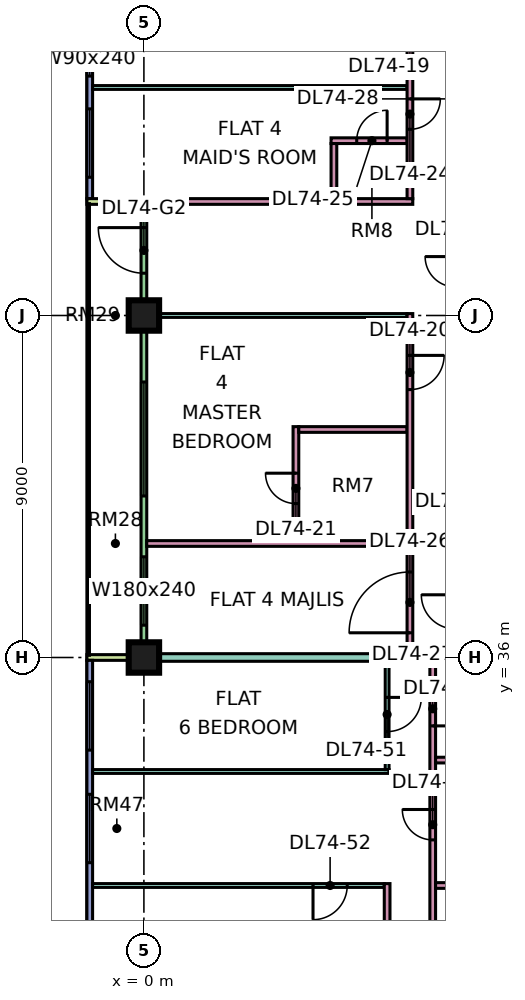
"""IFC4 building model, lengths in metres.
Left out: names, types, materials, properties, quantities, classifications, styles, units other than length and angle.
Written with IfcOpenShell. Run it as: python <this file> out.ifc"""

import sys

from ifc_helpers import new_model, si_unit, direction, frame, frame_2d, origin, origin_2d, place, context, subcontext, project, spatial, rectangle, extrude, element, fill, save


model = new_model("IFC4")
c1 = context("Model", 3, precision=1e-05, world=origin(), true_north=direction((0.0, 1.0)))
c2 = subcontext(c1, "Body", "Model", "MODEL_VIEW")
j1 = project(units=[si_unit("LENGTHUNIT", "METRE"), si_unit("PLANEANGLEUNIT", "RADIAN")], contexts=[c1])
p1 = place(None, origin())
s1 = spatial("IfcSite", under=j1, at=p1, CompositionType="ELEMENT")
p2 = place(p1, origin())
s2 = spatial("IfcBuilding", under=s1, at=p2, CompositionType="ELEMENT")
p3 = place(p2, frame((0.0, 0.0, 314.65)))
s3 = spatial("IfcBuildingStorey", under=s2, at=p3, CompositionType="ELEMENT", Elevation=314.65)
p4 = place(p3, frame((0.0, 36.0, 0.0), z_axis=(0.0, 0.0, 1.0), x_axis=(1.0, 0.0, 0.0)))
e1 = element("IfcColumn", 1, at=p4, inside=s3, PredefinedType="COLUMN", context=c2, shape_type="SweptSolid", body=[
    extrude(rectangle(XDim=0.8, YDim=0.8, at=origin_2d()), origin(), (0.0, 0.0, 1.0), 3.75),
])
p5 = place(p3, frame((0.0, 45.0, 0.0), z_axis=(0.0, 0.0, 1.0), x_axis=(1.0, 0.0, 0.0)))
e2 = element("IfcColumn", 2, at=p5, inside=s3, PredefinedType="COLUMN", context=c2, shape_type="SweptSolid", body=[
    extrude(rectangle(XDim=0.8, YDim=0.8, at=origin_2d()), origin(), (0.0, 0.0, 1.0), 3.75),
])
p6 = place(p3, frame((-1.425, 52.5, 0.0), z_axis=(0.0, 0.0, 1.0), x_axis=(0.0, -1.0, 0.0)))
e3 = element("IfcWall", 3, at=p6, inside=s3, PredefinedType="SOLIDWALL", context=c2, shape_type="SweptSolid", body=[
    extrude(rectangle(XDim=4.425, YDim=0.15, at=frame_2d((2.212, 0.0))), origin(), (0.0, 0.0, 1.0), 3.35),
])
p7 = place(p6, frame((0.3, 0.0, 0.45)))
e4 = element("IfcOpeningElement", 4, at=p7, cuts=e3, PredefinedType="OPENING", context=c2, shape_type="SweptSolid", body=[
    extrude(rectangle(XDim=0.9, YDim=2.4, at=frame_2d((0.45, 1.2))), frame((0.0, 0.085, 0.0), z_axis=(0.0, -1.0, 0.0), x_axis=(1.0, 0.0, 0.0)), (0.0, 0.0, 1.0), 0.17),
])
p8 = place(p6, frame((2.062, 0.0, 0.45)))
e5 = element("IfcOpeningElement", 5, at=p8, cuts=e3, PredefinedType="OPENING", context=c2, shape_type="SweptSolid", body=[
    extrude(rectangle(XDim=1.8, YDim=2.4, at=frame_2d((0.9, 1.2))), frame((0.0, 0.085, 0.0), z_axis=(0.0, -1.0, 0.0), x_axis=(1.0, 0.0, 0.0)), (0.0, 0.0, 1.0), 0.17),
])
p9 = place(p3, frame((0.0, 47.925, 0.0), z_axis=(0.0, 0.0, 1.0), x_axis=(0.0, -1.0, 0.0)))
e6 = element("IfcWall", 6, at=p9, inside=s3, PredefinedType="SOLIDWALL", context=c2, shape_type="SweptSolid", body=[
    extrude(rectangle(XDim=11.85, YDim=0.15, at=frame_2d((5.925, 0.0))), origin(), (0.0, 0.0, 1.0), 3.35),
])
p10 = place(p9, frame((0.613, 0.0, 0.0)))
e7 = element("IfcOpeningElement", 7, at=p10, cuts=e6, PredefinedType="OPENING", context=c2, shape_type="SweptSolid", body=[
    extrude(rectangle(XDim=1.2, YDim=2.4, at=frame_2d((0.6, 1.2))), frame((0.0, 0.085, 0.0), z_axis=(0.0, -1.0, 0.0), x_axis=(1.0, 0.0, 0.0)), (0.0, 0.0, 1.0), 0.17),
])
p11 = place(p9, frame((4.675, 0.0, 0.45)))
e8 = element("IfcOpeningElement", 8, at=p11, cuts=e6, PredefinedType="OPENING", context=c2, shape_type="SweptSolid", body=[
    extrude(rectangle(XDim=3.0, YDim=2.4, at=frame_2d((1.5, 1.2))), frame((0.0, 0.085, 0.0), z_axis=(0.0, -1.0, 0.0), x_axis=(1.0, 0.0, 0.0)), (0.0, 0.0, 1.0), 0.17),
])
p12 = place(p9, frame((9.275, 0.0, 0.45)))
e9 = element("IfcOpeningElement", 9, at=p12, cuts=e6, PredefinedType="OPENING", context=c2, shape_type="SweptSolid", body=[
    extrude(rectangle(XDim=1.8, YDim=2.4, at=frame_2d((0.9, 1.2))), frame((0.0, 0.085, 0.0), z_axis=(0.0, -1.0, 0.0), x_axis=(1.0, 0.0, 0.0)), (0.0, 0.0, 1.0), 0.17),
])
for number, where, z_axis, x_axis in (
    (10, (-1.5, 48.0, 0.0), (0.0, 0.0, 1.0), (1.0, 0.0, 0.0)),
    (11, (-1.5, 36.0, 0.0), (0.0, 0.0, 1.0), (1.0, 0.0, 0.0)),
):
    element("IfcWall", number, at=place(p3, frame(where, z_axis=z_axis, x_axis=x_axis)), inside=s3, PredefinedType="SOLIDWALL", context=c2, shape_type="SweptSolid", body=[
        extrude(rectangle(XDim=1.5, YDim=0.15, at=frame_2d((0.75, 0.0))), origin(), (0.0, 0.0, 1.0), 3.35),
    ])
p13 = place(p3, frame((-1.425, 35.925, 0.0), z_axis=(0.0, 0.0, 1.0), x_axis=(0.0, -1.0, 0.0)))
e12 = element("IfcWall", 12, at=p13, inside=s3, PredefinedType="SOLIDWALL", context=c2, shape_type="SweptSolid", body=[
    extrude(rectangle(XDim=11.85, YDim=0.15, at=frame_2d((5.925, 0.0))), origin(), (0.0, 0.0, 1.0), 3.35),
])
p14 = place(p13, frame((0.562, 0.0, 0.45)))
e13 = element("IfcOpeningElement", 13, at=p14, cuts=e12, PredefinedType="OPENING", context=c2, shape_type="SweptSolid", body=[
    extrude(rectangle(XDim=1.8, YDim=2.4, at=frame_2d((0.9, 1.2))), frame((0.0, 0.085, 0.0), z_axis=(0.0, -1.0, 0.0), x_axis=(1.0, 0.0, 0.0)), (0.0, 0.0, 1.0), 0.17),
])
p15 = place(p13, frame((3.525, 0.0, 0.45)))
e14 = element("IfcOpeningElement", 14, at=p15, cuts=e12, PredefinedType="OPENING", context=c2, shape_type="SweptSolid", body=[
    extrude(rectangle(XDim=1.8, YDim=2.4, at=frame_2d((0.9, 1.2))), frame((0.0, 0.085, 0.0), z_axis=(0.0, -1.0, 0.0), x_axis=(1.0, 0.0, 0.0)), (0.0, 0.0, 1.0), 0.17),
])
p16 = place(p13, frame((7.387, 0.0, 0.45)))
e15 = element("IfcOpeningElement", 15, at=p16, cuts=e12, PredefinedType="OPENING", context=c2, shape_type="SweptSolid", body=[
    extrude(rectangle(XDim=3.0, YDim=2.4, at=frame_2d((1.5, 1.2))), frame((0.0, 0.085, 0.0), z_axis=(0.0, -1.0, 0.0), x_axis=(1.0, 0.0, 0.0)), (0.0, 0.0, 1.0), 0.17),
])
p17 = place(p3, frame((-1.351, 51.0, 0.0), z_axis=(0.0, 0.0, 1.0), x_axis=(1.0, 0.0, 0.0)))
e16 = element("IfcWall", 16, at=p17, inside=s3, PredefinedType="PARTITIONING", context=c2, shape_type="SweptSolid", body=[
    extrude(rectangle(XDim=8.276, YDim=0.1, at=frame_2d((4.138, 0.0))), origin(), (0.0, 0.0, 1.0), 3.35),
])
p18 = place(p3, frame((-1.35, 30.0, 0.0), z_axis=(0.0, 0.0, 1.0), x_axis=(1.0, 0.0, 0.0)))
e17 = element("IfcWall", 17, at=p18, inside=s3, PredefinedType="PARTITIONING", context=c2, shape_type="SweptSolid", body=[
    extrude(rectangle(XDim=7.675, YDim=0.1, at=frame_2d((3.837, 0.0))), origin(), (0.0, 0.0, 1.0), 3.35),
])
p19 = place(p18, frame((5.8, 0.0, 0.0)))
e18 = element("IfcOpeningElement", 18, at=p19, cuts=e17, PredefinedType="OPENING", context=c2, shape_type="SweptSolid", body=[
    extrude(rectangle(XDim=0.9, YDim=2.1, at=frame_2d((0.45, 1.05))), frame((0.0, 0.06, 0.0), z_axis=(0.0, -1.0, 0.0), x_axis=(1.0, 0.0, 0.0)), (0.0, 0.0, 1.0), 0.12),
])
p20 = place(p3, frame((-1.35, 33.0, 0.0), z_axis=(0.0, 0.0, 1.0), x_axis=(1.0, 0.0, 0.0)))
e19 = element("IfcWall", 19, at=p20, inside=s3, PredefinedType="PARTITIONING", context=c2, shape_type="SweptSolid", body=[
    extrude(rectangle(XDim=7.8, YDim=0.1, at=frame_2d((3.9, 0.0))), origin(), (0.0, 0.0, 1.0), 3.35),
])
e20 = element("IfcWall", 20, at=p4, inside=s3, PredefinedType="PARTITIONING", context=c2, shape_type="SweptSolid", body=[
    extrude(rectangle(XDim=12.3, YDim=0.2, at=frame_2d((6.15, 0.0))), origin(), (0.0, 0.0, 1.0), 3.35),
])
p21 = place(p3, frame((0.0, 48.0, 0.0), z_axis=(0.0, 0.0, 1.0), x_axis=(1.0, 0.0, 0.0)))
e21 = element("IfcWall", 21, at=p21, inside=s3, PredefinedType="PARTITIONING", context=c2, shape_type="SweptSolid", body=[
    extrude(rectangle(XDim=7.075, YDim=0.15, at=frame_2d((3.538, 0.0))), origin(), (0.0, 0.0, 1.0), 3.35),
])
p22 = place(p3, frame((0.074, 39.0, 0.0), z_axis=(0.0, 0.0, 1.0), x_axis=(1.0, 0.0, 0.0)))
e22 = element("IfcWall", 22, at=p22, inside=s3, PredefinedType="PARTITIONING", context=c2, shape_type="SweptSolid", body=[
    extrude(rectangle(XDim=6.851, YDim=0.15, at=frame_2d((3.426, 0.0))), origin(), (0.0, 0.0, 1.0), 3.35),
])
p23 = place(p3, frame((0.074, 45.0, 0.0), z_axis=(0.0, 0.0, 1.0), x_axis=(1.0, 0.0, 0.0)))
e23 = element("IfcWall", 23, at=p23, inside=s3, PredefinedType="PARTITIONING", context=c2, shape_type="SweptSolid", body=[
    extrude(rectangle(XDim=6.851, YDim=0.1, at=frame_2d((3.426, 0.0))), origin(), (0.0, 0.0, 1.0), 3.35),
])
p24 = place(p3, frame((4.0, 39.075, 0.0), z_axis=(0.0, 0.0, 1.0), x_axis=(0.0, 1.0, 0.0)))
e24 = element("IfcWall", 24, at=p24, inside=s3, PredefinedType="PARTITIONING", context=c2, shape_type="SweptSolid", body=[
    extrude(rectangle(XDim=3.0, YDim=0.15, at=frame_2d((1.5, 0.0))), origin(), (0.0, 0.0, 1.0), 3.35),
])
p25 = place(p24, frame((0.975, 0.0, 0.0)))
e25 = element("IfcOpeningElement", 25, at=p25, cuts=e24, PredefinedType="OPENING", context=c2, shape_type="SweptSolid", body=[
    extrude(rectangle(XDim=0.8, YDim=2.1, at=frame_2d((0.4, 1.05))), frame((0.0, 0.085, 0.0), z_axis=(0.0, -1.0, 0.0), x_axis=(1.0, 0.0, 0.0)), (0.0, 0.0, 1.0), 0.17),
])
p26 = place(p3, frame((4.075, 42.0, 0.0), z_axis=(0.0, 0.0, 1.0), x_axis=(1.0, 0.0, 0.0)))
e26 = element("IfcWall", 26, at=p26, inside=s3, PredefinedType="PARTITIONING", context=c2, shape_type="SweptSolid", body=[
    extrude(rectangle(XDim=2.85, YDim=0.15, at=frame_2d((1.425, 0.0))), origin(), (0.0, 0.0, 1.0), 3.35),
])
p27 = place(p3, frame((4.925, 49.6, 0.0), z_axis=(0.0, 0.0, 1.0), x_axis=(1.0, 0.0, 0.0)))
e27 = element("IfcWall", 27, at=p27, inside=s3, PredefinedType="PARTITIONING", context=c2, shape_type="SweptSolid", body=[
    extrude(rectangle(XDim=2.0, YDim=0.15, at=frame_2d((1.0, 0.0))), origin(), (0.0, 0.0, 1.0), 3.35),
])
p28 = place(p27, frame((0.675, 0.0, 0.0)))
e28 = element("IfcOpeningElement", 28, at=p28, cuts=e27, PredefinedType="OPENING", context=c2, shape_type="SweptSolid", body=[
    extrude(rectangle(XDim=0.8, YDim=2.1, at=frame_2d((0.4, 1.05))), frame((0.0, 0.085, 0.0), z_axis=(0.0, -1.0, 0.0), x_axis=(1.0, 0.0, 0.0)), (0.0, 0.0, 1.0), 0.17),
])
p29 = place(p3, frame((5.0, 48.075, 0.0), z_axis=(0.0, 0.0, 1.0), x_axis=(0.0, 1.0, 0.0)))
e29 = element("IfcWall", 29, at=p29, inside=s3, PredefinedType="PARTITIONING", context=c2, shape_type="SweptSolid", body=[
    extrude(rectangle(XDim=1.45, YDim=0.15, at=frame_2d((0.725, 0.0))), origin(), (0.0, 0.0, 1.0), 3.35),
])
p30 = place(p3, frame((6.4, 22.5, 0.0), z_axis=(0.0, 0.0, 1.0), x_axis=(0.0, 1.0, 0.0)))
e30 = element("IfcWall", 30, at=p30, inside=s3, PredefinedType="PARTITIONING", context=c2, shape_type="SweptSolid", body=[
    extrude(rectangle(XDim=7.55, YDim=0.15, at=frame_2d((3.775, 0.0))), origin(), (0.0, 0.0, 1.0), 3.35),
])
p31 = place(p3, frame((6.4, 33.05, 0.0), z_axis=(0.0, 0.0, 1.0), x_axis=(0.0, 1.0, 0.0)))
e31 = element("IfcWall", 31, at=p31, inside=s3, PredefinedType="PARTITIONING", context=c2, shape_type="SweptSolid", body=[
    extrude(rectangle(XDim=2.85, YDim=0.1, at=frame_2d((1.425, 0.0))), origin(), (0.0, 0.0, 1.0), 3.35),
])
p32 = place(p31, frame((1.0, 0.0, 0.0)))
e32 = element("IfcOpeningElement", 32, at=p32, cuts=e31, PredefinedType="OPENING", context=c2, shape_type="SweptSolid", body=[
    extrude(rectangle(XDim=0.9, YDim=2.1, at=frame_2d((0.45, 1.05))), frame((0.0, 0.06, 0.0), z_axis=(0.0, -1.0, 0.0), x_axis=(1.0, 0.0, 0.0)), (0.0, 0.0, 1.0), 0.12),
])
p33 = place(p3, frame((7.0, 36.1, 0.0), z_axis=(0.0, 0.0, 1.0), x_axis=(0.0, 1.0, 0.0)))
e33 = element("IfcWall", 33, at=p33, inside=s3, PredefinedType="PARTITIONING", context=c2, shape_type="SweptSolid", body=[
    extrude(rectangle(XDim=8.95, YDim=0.15, at=frame_2d((4.475, 0.0))), origin(), (0.0, 0.0, 1.0), 3.35),
])
p34 = place(p33, frame((6.95, 0.0, 0.0)))
e34 = element("IfcOpeningElement", 34, at=p34, cuts=e33, PredefinedType="OPENING", context=c2, shape_type="SweptSolid", body=[
    extrude(rectangle(XDim=0.9, YDim=2.1, at=frame_2d((0.45, 1.05))), frame((0.0, 0.085, 0.0), z_axis=(0.0, -1.0, 0.0), x_axis=(1.0, 0.0, 0.0)), (0.0, 0.0, 1.0), 0.17),
])
p35 = place(p33, frame((0.55, 0.0, 0.0)))
e35 = element("IfcOpeningElement", 35, at=p35, cuts=e33, PredefinedType="OPENING", context=c2, shape_type="SweptSolid", body=[
    extrude(rectangle(XDim=1.6, YDim=2.1, at=frame_2d((0.8, 1.05))), frame((0.0, 0.085, 0.0), z_axis=(0.0, -1.0, 0.0), x_axis=(1.0, 0.0, 0.0)), (0.0, 0.0, 1.0), 0.17),
])
p36 = place(p3, frame((7.0, 48.075, 0.0), z_axis=(0.0, 0.0, 1.0), x_axis=(0.0, 1.0, 0.0)))
e36 = element("IfcWall", 36, at=p36, inside=s3, PredefinedType="PARTITIONING", context=c2, shape_type="SweptSolid", body=[
    extrude(rectangle(XDim=7.275, YDim=0.15, at=frame_2d((3.638, 0.0))), origin(), (0.0, 0.0, 1.0), 3.35),
])
p37 = place(p36, frame((3.975, 0.0, 0.0)))
e37 = element("IfcOpeningElement", 37, at=p37, cuts=e36, PredefinedType="OPENING", context=c2, shape_type="SweptSolid", body=[
    extrude(rectangle(XDim=0.9, YDim=2.1, at=frame_2d((0.45, 1.05))), frame((0.0, 0.085, 0.0), z_axis=(0.0, -1.0, 0.0), x_axis=(1.0, 0.0, 0.0)), (0.0, 0.0, 1.0), 0.17),
])
p38 = place(p36, frame((1.825, 0.0, 0.0)))
e38 = element("IfcOpeningElement", 38, at=p38, cuts=e36, PredefinedType="OPENING", context=c2, shape_type="SweptSolid", body=[
    extrude(rectangle(XDim=0.8, YDim=2.1, at=frame_2d((0.4, 1.05))), frame((0.0, 0.085, 0.0), z_axis=(0.0, -1.0, 0.0), x_axis=(1.0, 0.0, 0.0)), (0.0, 0.0, 1.0), 0.17),
])
p39 = place(p3, frame((7.6, 27.55, 0.0), z_axis=(0.0, 0.0, 1.0), x_axis=(0.0, 1.0, 0.0)))
e39 = element("IfcWall", 39, at=p39, inside=s3, PredefinedType="PARTITIONING", context=c2, shape_type="SweptSolid", body=[
    extrude(rectangle(XDim=8.35, YDim=0.15, at=frame_2d((4.175, 0.0))), origin(), (0.0, 0.0, 1.0), 3.35),
])
p40 = place(p39, frame((3.65, 0.0, 0.0)))
e40 = element("IfcOpeningElement", 40, at=p40, cuts=e39, PredefinedType="OPENING", context=c2, shape_type="SweptSolid", body=[
    extrude(rectangle(XDim=0.8, YDim=2.1, at=frame_2d((0.4, 1.05))), frame((0.0, 0.085, 0.0), z_axis=(0.0, -1.0, 0.0), x_axis=(1.0, 0.0, 0.0)), (0.0, 0.0, 1.0), 0.17),
])
p41 = place(p39, frame((6.65, 0.0, 0.0)))
e41 = element("IfcOpeningElement", 41, at=p41, cuts=e39, PredefinedType="OPENING", context=c2, shape_type="SweptSolid", body=[
    extrude(rectangle(XDim=0.9, YDim=2.1, at=frame_2d((0.45, 1.05))), frame((0.0, 0.085, 0.0), z_axis=(0.0, -1.0, 0.0), x_axis=(1.0, 0.0, 0.0)), (0.0, 0.0, 1.0), 0.17),
])
for number, where, z_axis, x_axis in (
    (42, (7.675, 30.0, 0.0), (0.0, 0.0, 1.0), (1.0, 0.0, 0.0)),
    (43, (7.675, 33.3, 0.0), (0.0, 0.0, 1.0), (1.0, 0.0, 0.0)),
):
    element("IfcWall", number, at=place(p3, frame(where, z_axis=z_axis, x_axis=x_axis)), inside=s3, PredefinedType="PARTITIONING", context=c2, shape_type="SweptSolid", body=[
        extrude(rectangle(XDim=4.625, YDim=0.15, at=frame_2d((2.312, 0.0))), origin(), (0.0, 0.0, 1.0), 3.35),
    ])
p42 = place(p7, origin())
e44 = element("IfcWindow", 44, at=p42, inside=s3, PartitioningType="SINGLE_PANEL", PredefinedType="WINDOW", context=c2, shape_type="SweptSolid", body=[
    extrude(rectangle(XDim=0.9, YDim=2.4, at=frame_2d((0.45, 1.2))), frame((0.0, 0.03, 0.0), z_axis=(0.0, -1.0, 0.0), x_axis=(1.0, 0.0, 0.0)), (0.0, 0.0, 1.0), 0.06),
])
fill(e4, e44)
p43 = place(p8, origin())
e45 = element("IfcWindow", 45, at=p43, inside=s3, PartitioningType="SINGLE_PANEL", PredefinedType="WINDOW", context=c2, shape_type="SweptSolid", body=[
    extrude(rectangle(XDim=1.8, YDim=2.4, at=frame_2d((0.9, 1.2))), frame((0.0, 0.03, 0.0), z_axis=(0.0, -1.0, 0.0), x_axis=(1.0, 0.0, 0.0)), (0.0, 0.0, 1.0), 0.06),
])
fill(e5, e45)
p44 = place(p10, frame((1.2, 0.0, 0.0), z_axis=(0.0, 0.0, 1.0), x_axis=(-1.0, 0.0, 0.0)))
e46 = element("IfcDoor", 46, at=p44, inside=s3, OperationType="DOUBLE_DOOR_SINGLE_SWING", PredefinedType="DOOR", context=c2, shape_type="SweptSolid", body=[
    extrude(rectangle(XDim=1.2, YDim=2.4, at=frame_2d((0.6, 1.2))), frame((0.0, 0.025, 0.0), z_axis=(0.0, -1.0, 0.0), x_axis=(1.0, 0.0, 0.0)), (0.0, 0.0, 1.0), 0.05),
])
fill(e7, e46)
p45 = place(p11, origin())
e47 = element("IfcWindow", 47, at=p45, inside=s3, PartitioningType="SINGLE_PANEL", PredefinedType="WINDOW", context=c2, shape_type="SweptSolid", body=[
    extrude(rectangle(XDim=3.0, YDim=2.4, at=frame_2d((1.5, 1.2))), frame((0.0, 0.03, 0.0), z_axis=(0.0, -1.0, 0.0), x_axis=(1.0, 0.0, 0.0)), (0.0, 0.0, 1.0), 0.06),
])
fill(e8, e47)
p46 = place(p12, origin())
e48 = element("IfcWindow", 48, at=p46, inside=s3, PartitioningType="SINGLE_PANEL", PredefinedType="WINDOW", context=c2, shape_type="SweptSolid", body=[
    extrude(rectangle(XDim=1.8, YDim=2.4, at=frame_2d((0.9, 1.2))), frame((0.0, 0.03, 0.0), z_axis=(0.0, -1.0, 0.0), x_axis=(1.0, 0.0, 0.0)), (0.0, 0.0, 1.0), 0.06),
])
fill(e9, e48)
p47 = place(p14, origin())
e49 = element("IfcWindow", 49, at=p47, inside=s3, PartitioningType="SINGLE_PANEL", PredefinedType="WINDOW", context=c2, shape_type="SweptSolid", body=[
    extrude(rectangle(XDim=1.8, YDim=2.4, at=frame_2d((0.9, 1.2))), frame((0.0, 0.03, 0.0), z_axis=(0.0, -1.0, 0.0), x_axis=(1.0, 0.0, 0.0)), (0.0, 0.0, 1.0), 0.06),
])
fill(e13, e49)
p48 = place(p15, origin())
e50 = element("IfcWindow", 50, at=p48, inside=s3, PartitioningType="SINGLE_PANEL", PredefinedType="WINDOW", context=c2, shape_type="SweptSolid", body=[
    extrude(rectangle(XDim=1.8, YDim=2.4, at=frame_2d((0.9, 1.2))), frame((0.0, 0.03, 0.0), z_axis=(0.0, -1.0, 0.0), x_axis=(1.0, 0.0, 0.0)), (0.0, 0.0, 1.0), 0.06),
])
fill(e14, e50)
p49 = place(p34, origin())
e51 = element("IfcDoor", 51, at=p49, inside=s3, OperationType="SINGLE_SWING_RIGHT", PredefinedType="DOOR", context=c2, shape_type="SweptSolid", body=[
    extrude(rectangle(XDim=0.9, YDim=2.1, at=frame_2d((0.45, 1.05))), frame((0.0, 0.025, 0.0), z_axis=(0.0, -1.0, 0.0), x_axis=(1.0, 0.0, 0.0)), (0.0, 0.0, 1.0), 0.05),
])
fill(e34, e51)
p50 = place(p25, frame((0.8, 0.0, 0.0), z_axis=(0.0, 0.0, 1.0), x_axis=(-1.0, 0.0, 0.0)))
e52 = element("IfcDoor", 52, at=p50, inside=s3, OperationType="SINGLE_SWING_RIGHT", PredefinedType="DOOR", context=c2, shape_type="SweptSolid", body=[
    extrude(rectangle(XDim=0.8, YDim=2.1, at=frame_2d((0.4, 1.05))), frame((0.0, 0.025, 0.0), z_axis=(0.0, -1.0, 0.0), x_axis=(1.0, 0.0, 0.0)), (0.0, 0.0, 1.0), 0.05),
])
fill(e25, e52)
p51 = place(p38, origin())
e53 = element("IfcDoor", 53, at=p51, inside=s3, OperationType="SINGLE_SWING_RIGHT", PredefinedType="DOOR", context=c2, shape_type="SweptSolid", body=[
    extrude(rectangle(XDim=0.8, YDim=2.1, at=frame_2d((0.4, 1.05))), frame((0.0, 0.025, 0.0), z_axis=(0.0, -1.0, 0.0), x_axis=(1.0, 0.0, 0.0)), (0.0, 0.0, 1.0), 0.05),
])
fill(e38, e53)
p52 = place(p28, frame((0.8, 0.0, 0.0), z_axis=(0.0, 0.0, 1.0), x_axis=(-1.0, 0.0, 0.0)))
e54 = element("IfcDoor", 54, at=p52, inside=s3, OperationType="SINGLE_SWING_RIGHT", PredefinedType="DOOR", context=c2, shape_type="SweptSolid", body=[
    extrude(rectangle(XDim=0.8, YDim=2.1, at=frame_2d((0.4, 1.05))), frame((0.0, 0.025, 0.0), z_axis=(0.0, -1.0, 0.0), x_axis=(1.0, 0.0, 0.0)), (0.0, 0.0, 1.0), 0.05),
])
fill(e28, e54)
p53 = place(p35, origin())
e55 = element("IfcDoor", 55, at=p53, inside=s3, OperationType="DOUBLE_DOOR_SINGLE_SWING", PredefinedType="DOOR", context=c2, shape_type="SweptSolid", body=[
    extrude(rectangle(XDim=1.6, YDim=2.1, at=frame_2d((0.8, 1.05))), frame((0.0, 0.025, 0.0), z_axis=(0.0, -1.0, 0.0), x_axis=(1.0, 0.0, 0.0)), (0.0, 0.0, 1.0), 0.05),
])
fill(e35, e55)
p54 = place(p40, frame((0.8, 0.0, 0.0), z_axis=(0.0, 0.0, 1.0), x_axis=(-1.0, 0.0, 0.0)))
e56 = element("IfcDoor", 56, at=p54, inside=s3, OperationType="SINGLE_SWING_RIGHT", PredefinedType="DOOR", context=c2, shape_type="SweptSolid", body=[
    extrude(rectangle(XDim=0.8, YDim=2.1, at=frame_2d((0.4, 1.05))), frame((0.0, 0.025, 0.0), z_axis=(0.0, -1.0, 0.0), x_axis=(1.0, 0.0, 0.0)), (0.0, 0.0, 1.0), 0.05),
])
fill(e40, e56)
p55 = place(p32, origin())
e57 = element("IfcDoor", 57, at=p55, inside=s3, OperationType="SINGLE_SWING_RIGHT", PredefinedType="DOOR", context=c2, shape_type="SweptSolid", body=[
    extrude(rectangle(XDim=0.9, YDim=2.1, at=frame_2d((0.45, 1.05))), frame((0.0, 0.025, 0.0), z_axis=(0.0, -1.0, 0.0), x_axis=(1.0, 0.0, 0.0)), (0.0, 0.0, 1.0), 0.05),
])
fill(e32, e57)
p56 = place(p19, frame((0.9, 0.0, 0.0), z_axis=(0.0, 0.0, 1.0), x_axis=(-1.0, 0.0, 0.0)))
e58 = element("IfcDoor", 58, at=p56, inside=s3, OperationType="SINGLE_SWING_LEFT", PredefinedType="DOOR", context=c2, shape_type="SweptSolid", body=[
    extrude(rectangle(XDim=0.9, YDim=2.1, at=frame_2d((0.45, 1.05))), frame((0.0, 0.025, 0.0), z_axis=(0.0, -1.0, 0.0), x_axis=(1.0, 0.0, 0.0)), (0.0, 0.0, 1.0), 0.05),
])
fill(e18, e58)
p57 = place(p41, frame((0.9, 0.0, 0.0), z_axis=(0.0, 0.0, 1.0), x_axis=(-1.0, 0.0, 0.0)))
e59 = element("IfcDoor", 59, at=p57, inside=s3, OperationType="SINGLE_SWING_LEFT", PredefinedType="DOOR", context=c2, shape_type="SweptSolid", body=[
    extrude(rectangle(XDim=0.9, YDim=2.1, at=frame_2d((0.45, 1.05))), frame((0.0, 0.025, 0.0), z_axis=(0.0, -1.0, 0.0), x_axis=(1.0, 0.0, 0.0)), (0.0, 0.0, 1.0), 0.05),
])
fill(e41, e59)
save(model, sys.argv[1])
